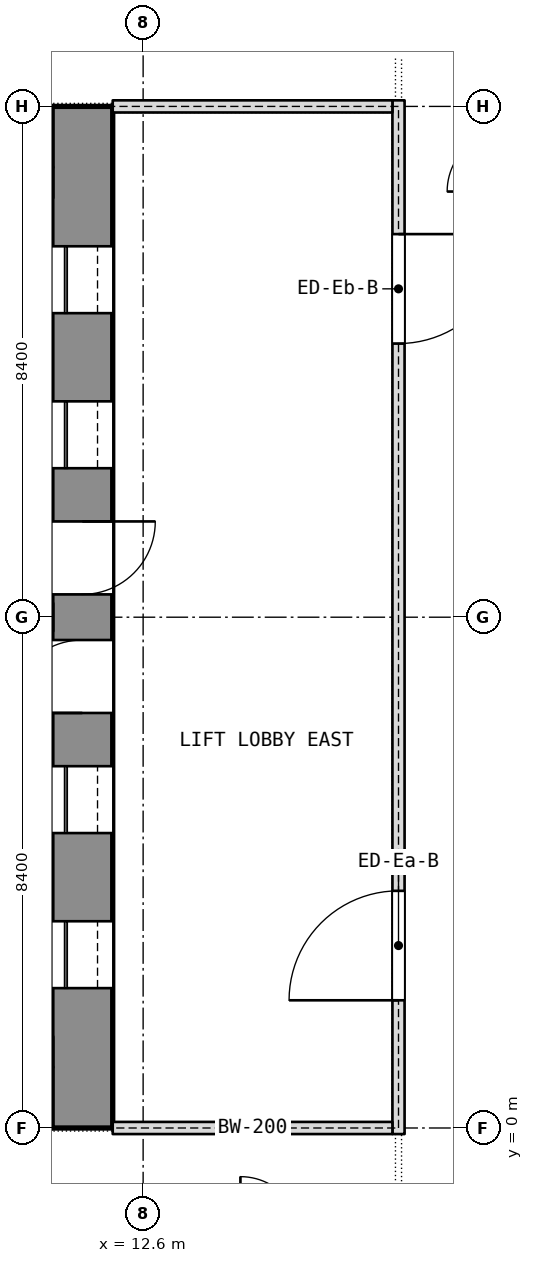
"""IFC4 building model, lengths in metres.
Left out: names, types, materials, properties, quantities, classifications, styles, units other than length and angle.
Written with IfcOpenShell. Run it as: python <this file> out.ifc"""

import sys

from ifc_helpers import new_model, si_unit, direction, frame, frame_2d, origin, place, context, subcontext, project, spatial, rectangle, extrude, element, fill, save


model = new_model("IFC4")
c1 = context("Model", 3, precision=1e-05, world=origin(), true_north=direction((0.0, 1.0)))
c2 = subcontext(c1, "Body", "Model", "MODEL_VIEW")
j1 = project(units=[si_unit("LENGTHUNIT", "METRE"), si_unit("PLANEANGLEUNIT", "RADIAN")], contexts=[c1])
p1 = place(None, origin())
s1 = spatial("IfcSite", under=j1, at=p1, CompositionType="ELEMENT")
p2 = place(p1, origin())
s2 = spatial("IfcBuilding", under=s1, at=p2, CompositionType="ELEMENT")
p3 = place(p2, frame((0.0, 0.0, 166.1)))
s3 = spatial("IfcBuildingStorey", under=s2, at=p3, CompositionType="ELEMENT", Elevation=166.1)
p4 = place(p3, frame((11.6, 0.0, 0.0), z_axis=(0.0, 0.0, 1.0), x_axis=(0.0, 1.0, 0.0)))
e1 = element("IfcWall", 1, at=p4, inside=s3, PredefinedType="SHEAR", context=c2, shape_type="SweptSolid", body=[
    extrude(rectangle(XDim=16.8, YDim=1.0, at=frame_2d((8.4, 0.0))), origin(), (0.0, 0.0, 1.0), 3.6),
])
p5 = place(p4, frame((2.3, 0.0, 0.0)))
e2 = element("IfcOpeningElement", 2, at=p5, cuts=e1, PredefinedType="OPENING", context=c2, shape_type="SweptSolid", body=[
    extrude(rectangle(XDim=1.1, YDim=2.1, at=frame_2d((0.55, 1.05))), frame((0.0, 0.5, 0.0), z_axis=(0.0, -1.0, 0.0), x_axis=(1.0, 0.0, 0.0)), (0.0, 0.0, 1.0), 1.0),
])
p6 = place(p4, frame((4.85, 0.0, 0.0)))
e3 = element("IfcOpeningElement", 3, at=p6, cuts=e1, PredefinedType="OPENING", context=c2, shape_type="SweptSolid", body=[
    extrude(rectangle(XDim=1.1, YDim=2.1, at=frame_2d((0.55, 1.05))), frame((0.0, 0.5, 0.0), z_axis=(0.0, -1.0, 0.0), x_axis=(1.0, 0.0, 0.0)), (0.0, 0.0, 1.0), 1.0),
])
p7 = place(p4, frame((6.825, 0.0, 0.0)))
e4 = element("IfcOpeningElement", 4, at=p7, cuts=e1, PredefinedType="OPENING", context=c2, shape_type="SweptSolid", body=[
    extrude(rectangle(XDim=1.2, YDim=2.1, at=frame_2d((0.6, 1.05))), frame((0.0, 0.5, 0.0), z_axis=(0.0, -1.0, 0.0), x_axis=(1.0, 0.0, 0.0)), (0.0, 0.0, 1.0), 1.0),
])
p8 = place(p4, frame((13.4, 0.0, 0.0)))
e5 = element("IfcOpeningElement", 5, at=p8, cuts=e1, PredefinedType="OPENING", context=c2, shape_type="SweptSolid", body=[
    extrude(rectangle(XDim=1.1, YDim=2.1, at=frame_2d((0.55, 1.05))), frame((0.0, 0.5, 0.0), z_axis=(0.0, -1.0, 0.0), x_axis=(1.0, 0.0, 0.0)), (0.0, 0.0, 1.0), 1.0),
])
p9 = place(p4, frame((10.85, 0.0, 0.0)))
e6 = element("IfcOpeningElement", 6, at=p9, cuts=e1, PredefinedType="OPENING", context=c2, shape_type="SweptSolid", body=[
    extrude(rectangle(XDim=1.1, YDim=2.1, at=frame_2d((0.55, 1.05))), frame((0.0, 0.5, 0.0), z_axis=(0.0, -1.0, 0.0), x_axis=(1.0, 0.0, 0.0)), (0.0, 0.0, 1.0), 1.0),
])
p10 = place(p4, frame((8.775, 0.0, 0.0)))
e7 = element("IfcOpeningElement", 7, at=p10, cuts=e1, PredefinedType="OPENING", context=c2, shape_type="SweptSolid", body=[
    extrude(rectangle(XDim=1.2, YDim=2.1, at=frame_2d((0.6, 1.05))), frame((0.0, 0.5, 0.0), z_axis=(0.0, -1.0, 0.0), x_axis=(1.0, 0.0, 0.0)), (0.0, 0.0, 1.0), 1.0),
])
p11 = place(p3, frame((16.8, -0.1, 0.0), z_axis=(0.0, 0.0, 1.0), x_axis=(0.0, 1.0, 0.0)))
e8 = element("IfcWall", 8, at=p11, inside=s3, PredefinedType="PARTITIONING", context=c2, shape_type="SweptSolid", body=[
    extrude(rectangle(XDim=17.0, YDim=0.2, at=frame_2d((8.5, 0.0))), origin(), (0.0, 0.0, 1.0), 3.3),
])
p12 = place(p11, frame((2.2, 0.0, 0.0)))
e9 = element("IfcOpeningElement", 9, at=p12, cuts=e8, PredefinedType="OPENING", context=c2, shape_type="SweptSolid", body=[
    extrude(rectangle(XDim=1.8, YDim=2.1, at=frame_2d((0.9, 1.05))), frame((0.0, 0.1, 0.0), z_axis=(0.0, -1.0, 0.0), x_axis=(1.0, 0.0, 0.0)), (0.0, 0.0, 1.0), 0.2),
])
p13 = place(p11, frame((13.0, 0.0, 0.0)))
e10 = element("IfcOpeningElement", 10, at=p13, cuts=e8, PredefinedType="OPENING", context=c2, shape_type="SweptSolid", body=[
    extrude(rectangle(XDim=1.8, YDim=2.1, at=frame_2d((0.9, 1.05))), frame((0.0, 0.1, 0.0), z_axis=(0.0, -1.0, 0.0), x_axis=(1.0, 0.0, 0.0)), (0.0, 0.0, 1.0), 0.2),
])
for number, where, z_axis, x_axis in (
    (11, (12.1, 0.0, 0.0), (0.0, 0.0, 1.0), (1.0, 0.0, 0.0)),
    (12, (12.1, 16.8, 0.0), (0.0, 0.0, 1.0), (1.0, 0.0, 0.0)),
):
    element("IfcWall", number, at=place(p3, frame(where, z_axis=z_axis, x_axis=x_axis)), inside=s3, PredefinedType="PARTITIONING", context=c2, shape_type="SweptSolid", body=[
        extrude(rectangle(XDim=4.6, YDim=0.2, at=frame_2d((2.3, 0.0))), origin(), (0.0, 0.0, 1.0), 2.85),
    ])
p14 = place(p5, origin())
e13 = element("IfcDoor", 13, at=p14, inside=s3, OperationType="SLIDING_TO_LEFT", PredefinedType="DOOR", context=c2, shape_type="SweptSolid", body=[
    extrude(rectangle(XDim=1.1, YDim=2.1, at=frame_2d((0.55, 1.05))), frame((0.0, 0.025, 0.0), z_axis=(0.0, -1.0, 0.0), x_axis=(1.0, 0.0, 0.0)), (0.0, 0.0, 1.0), 0.05),
])
fill(e2, e13)
p15 = place(p6, origin())
e14 = element("IfcDoor", 14, at=p15, inside=s3, OperationType="SLIDING_TO_LEFT", PredefinedType="DOOR", context=c2, shape_type="SweptSolid", body=[
    extrude(rectangle(XDim=1.1, YDim=2.1, at=frame_2d((0.55, 1.05))), frame((0.0, 0.025, 0.0), z_axis=(0.0, -1.0, 0.0), x_axis=(1.0, 0.0, 0.0)), (0.0, 0.0, 1.0), 0.05),
])
fill(e3, e14)
p16 = place(p7, origin())
e15 = element("IfcDoor", 15, at=p16, inside=s3, OperationType="SINGLE_SWING_LEFT", PredefinedType="DOOR", context=c2, shape_type="SweptSolid", body=[
    extrude(rectangle(XDim=1.2, YDim=2.1, at=frame_2d((0.6, 1.05))), frame((0.0, 0.025, 0.0), z_axis=(0.0, -1.0, 0.0), x_axis=(1.0, 0.0, 0.0)), (0.0, 0.0, 1.0), 0.05),
])
fill(e4, e15)
p17 = place(p8, origin())
e16 = element("IfcDoor", 16, at=p17, inside=s3, OperationType="SLIDING_TO_LEFT", PredefinedType="DOOR", context=c2, shape_type="SweptSolid", body=[
    extrude(rectangle(XDim=1.1, YDim=2.1, at=frame_2d((0.55, 1.05))), frame((0.0, 0.025, 0.0), z_axis=(0.0, -1.0, 0.0), x_axis=(1.0, 0.0, 0.0)), (0.0, 0.0, 1.0), 0.05),
])
fill(e5, e16)
p18 = place(p9, origin())
e17 = element("IfcDoor", 17, at=p18, inside=s3, OperationType="SLIDING_TO_LEFT", PredefinedType="DOOR", context=c2, shape_type="SweptSolid", body=[
    extrude(rectangle(XDim=1.1, YDim=2.1, at=frame_2d((0.55, 1.05))), frame((0.0, 0.025, 0.0), z_axis=(0.0, -1.0, 0.0), x_axis=(1.0, 0.0, 0.0)), (0.0, 0.0, 1.0), 0.05),
])
fill(e6, e17)
p19 = place(p10, origin())
e18 = element("IfcDoor", 18, at=p19, inside=s3, OperationType="SINGLE_SWING_LEFT", PredefinedType="DOOR", context=c2, shape_type="SweptSolid", body=[
    extrude(rectangle(XDim=1.2, YDim=2.1, at=frame_2d((0.6, 1.05))), frame((0.0, 0.025, 0.0), z_axis=(0.0, -1.0, 0.0), x_axis=(1.0, 0.0, 0.0)), (0.0, 0.0, 1.0), 0.05),
])
fill(e7, e18)
p20 = place(p12, origin())
e19 = element("IfcDoor", 19, at=p20, inside=s3, OperationType="DOUBLE_DOOR_SINGLE_SWING", PredefinedType="DOOR", context=c2, shape_type="SweptSolid", body=[
    extrude(rectangle(XDim=1.8, YDim=2.1, at=frame_2d((0.9, 1.05))), frame((0.0, 0.025, 0.0), z_axis=(0.0, -1.0, 0.0), x_axis=(1.0, 0.0, 0.0)), (0.0, 0.0, 1.0), 0.05),
])
fill(e9, e19)
p21 = place(p13, origin())
e20 = element("IfcDoor", 20, at=p21, inside=s3, OperationType="DOUBLE_DOOR_SINGLE_SWING", PredefinedType="DOOR", context=c2, shape_type="SweptSolid", body=[
    extrude(rectangle(XDim=1.8, YDim=2.1, at=frame_2d((0.9, 1.05))), frame((0.0, 0.025, 0.0), z_axis=(0.0, -1.0, 0.0), x_axis=(1.0, 0.0, 0.0)), (0.0, 0.0, 1.0), 0.05),
])
fill(e10, e20)
save(model, sys.argv[1])
